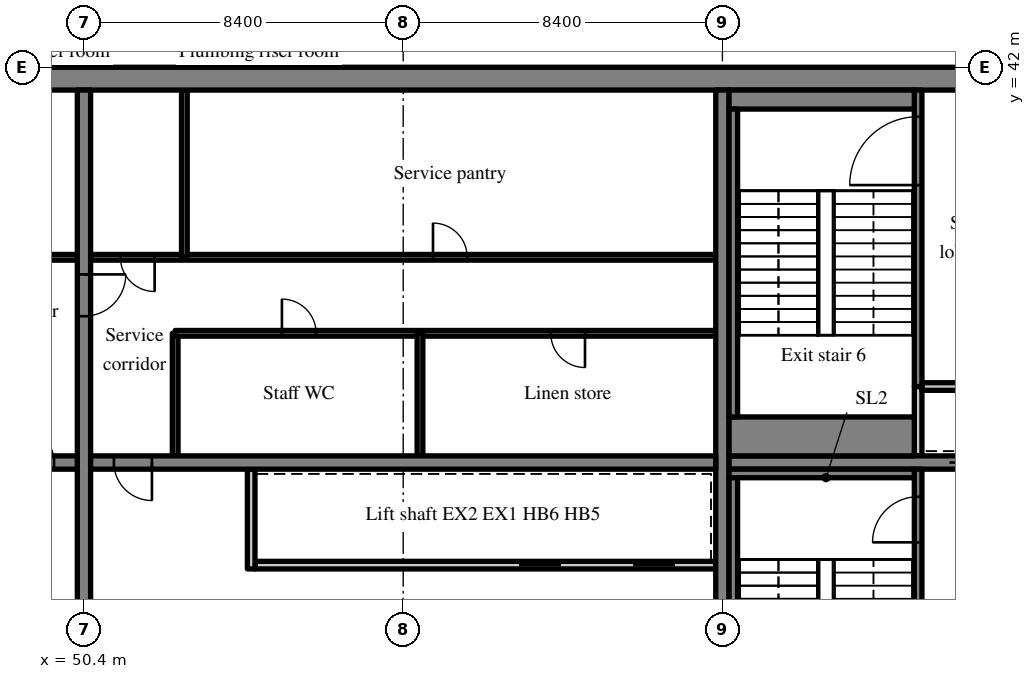
"""IFC4 building model, lengths in metres.
Left out: names, types, materials, properties, quantities, classifications, styles, units other than length and angle.
Written with IfcOpenShell. Run it as: python <this file> out.ifc"""

import sys

from ifc_helpers import new_model, si_unit, direction, frame, frame_2d, origin, place, context, subcontext, project, spatial, rectangle, extrude, source, transform, mapped, element, fill, save


model = new_model("IFC4")
c1 = context("Model", 3, precision=1e-05, world=origin(), true_north=direction((0.0, 1.0)))
c2 = subcontext(c1, "Body", "Model", "MODEL_VIEW")
j1 = project(units=[si_unit("LENGTHUNIT", "METRE"), si_unit("PLANEANGLEUNIT", "RADIAN")], contexts=[c1])
p1 = place(None, origin())
s1 = spatial("IfcSite", under=j1, at=p1, CompositionType="ELEMENT")
p2 = place(p1, origin())
s2 = spatial("IfcBuilding", under=s1, at=p2, CompositionType="ELEMENT")
p3 = place(p2, frame((0.0, 0.0, 256.9)))
s3 = spatial("IfcBuildingStorey", under=s2, at=p3, CompositionType="ELEMENT", Elevation=256.9)
m1 = source(origin(), c2, "Body", "SweptSolid", [
    extrude(rectangle(XDim=50.4, YDim=0.6, at=frame_2d((25.2, 0.0))), origin(), (0.0, 0.0, 1.0), 3.62),
])
p4 = place(p3, frame((25.2, 41.7, 0.0), z_axis=(0.0, 0.0, 1.0), x_axis=(1.0, 0.0, 0.0)))
e1 = element("IfcWall", 1, at=p4, inside=s3, PredefinedType="SHEAR", context=c2, shape_type="MappedRepresentation", body=[
    mapped(m1, transform((0.0, 0.0, 0.0), scale=1.0)),
])
m2 = source(origin(), c2, "Body", "SweptSolid", [
    extrude(rectangle(XDim=18.8, YDim=0.35, at=frame_2d((9.4, 0.0))), origin(), (0.0, 0.0, 1.0), 3.62),
])
p5 = place(p3, frame((50.4, 22.6, 0.0), z_axis=(0.0, 0.0, 1.0), x_axis=(0.0, 1.0, 0.0)))
e2 = element("IfcWall", 2, at=p5, inside=s3, PredefinedType="SHEAR", context=c2, shape_type="MappedRepresentation", body=[
    mapped(m2, transform((0.0, 0.0, 0.0), scale=1.0)),
])
m3 = source(origin(), c2, "Body", "SweptSolid", [
    extrude(rectangle(XDim=1.1, YDim=2.1, at=frame_2d((0.55, 1.05))), frame((0.0, 0.185, 0.0), z_axis=(0.0, -1.0, 0.0), x_axis=(1.0, 0.0, 0.0)), (0.0, 0.0, 1.0), 0.37),
])
p6 = place(p5, frame((12.85, 0.0, 0.0)))
e3 = element("IfcOpeningElement", 3, at=p6, cuts=e2, PredefinedType="OPENING", context=c2, shape_type="MappedRepresentation", body=[
    mapped(m3, transform((0.0, 0.0, 0.0), scale=1.0)),
])
p7 = place(p3, frame((67.2, 22.6, 0.0), z_axis=(0.0, 0.0, 1.0), x_axis=(0.0, 1.0, 0.0)))
e4 = element("IfcWall", 4, at=p7, inside=s3, PredefinedType="SHEAR", context=c2, shape_type="MappedRepresentation", body=[
    mapped(m2, transform((0.0, 0.0, 0.0), scale=1.0)),
])
m4 = source(origin(), c2, "Body", "SweptSolid", [
    extrude(rectangle(XDim=16.45, YDim=0.35, at=frame_2d((8.225, 0.0))), origin(), (0.0, 0.0, 1.0), 3.62),
])
p8 = place(p3, frame((33.775, 31.6, 0.0), z_axis=(0.0, 0.0, 1.0), x_axis=(1.0, 0.0, 0.0)))
e5 = element("IfcWall", 5, at=p8, inside=s3, PredefinedType="SHEAR", context=c2, shape_type="MappedRepresentation", body=[
    mapped(m4, transform((0.0, 0.0, 0.0), scale=1.0)),
])
m5 = source(origin(), c2, "Body", "SweptSolid", [
    extrude(rectangle(XDim=1.0, YDim=2.1, at=frame_2d((0.5, 1.05))), frame((0.0, 0.185, 0.0), z_axis=(0.0, -1.0, 0.0), x_axis=(1.0, 0.0, 0.0)), (0.0, 0.0, 1.0), 0.37),
])
p9 = place(p8, frame((14.837, 0.0, 0.0)))
e6 = element("IfcOpeningElement", 6, at=p9, cuts=e5, PredefinedType="OPENING", context=c2, shape_type="MappedRepresentation", body=[
    mapped(m5, transform((0.0, 0.0, 0.0), scale=1.0)),
])
m6 = source(origin(), c2, "Body", "SweptSolid", [
    extrude(rectangle(XDim=16.45, YDim=0.35, at=frame_2d((8.225, 0.0))), origin(), (0.0, 0.0, 1.0), 3.62),
])
p10 = place(p3, frame((50.575, 31.6, 0.0), z_axis=(0.0, 0.0, 1.0), x_axis=(1.0, 0.0, 0.0)))
e7 = element("IfcWall", 7, at=p10, inside=s3, PredefinedType="SHEAR", context=c2, shape_type="MappedRepresentation", body=[
    mapped(m6, transform((0.0, 0.0, 0.0), scale=1.0)),
])
p11 = place(p10, frame((0.613, 0.0, 0.0)))
e8 = element("IfcOpeningElement", 8, at=p11, cuts=e7, PredefinedType="OPENING", context=c2, shape_type="MappedRepresentation", body=[
    mapped(m5, transform((0.0, 0.0, 0.0), scale=1.0)),
])
m7 = source(origin(), c2, "Body", "SweptSolid", [
    extrude(rectangle(XDim=7.625, YDim=0.35, at=frame_2d((3.812, 0.0))), origin(), (0.0, 0.0, 1.0), 3.62),
])
p12 = place(p3, frame((67.375, 31.6, 0.0), z_axis=(0.0, 0.0, 1.0), x_axis=(1.0, 0.0, 0.0)))
e9 = element("IfcWall", 9, at=p12, inside=s3, PredefinedType="SHEAR", context=c2, shape_type="MappedRepresentation", body=[
    mapped(m7, transform((0.0, 0.0, 0.0), scale=1.0)),
])
p13 = place(p12, frame((5.8, 0.0, 0.0)))
e10 = element("IfcOpeningElement", 10, at=p13, cuts=e9, PredefinedType="OPENING", context=c2, shape_type="MappedRepresentation", body=[
    mapped(m3, transform((0.0, 0.0, 0.0), scale=1.0)),
])
m8 = source(origin(), c2, "Body", "SweptSolid", [
    extrude(rectangle(XDim=16.45, YDim=0.15, at=frame_2d((8.225, 0.0))), origin(), (0.0, 0.0, 1.0), 3.62),
])
p14 = place(p3, frame((33.775, 37.0, 0.0), z_axis=(0.0, 0.0, 1.0), x_axis=(1.0, 0.0, 0.0)))
e11 = element("IfcWall", 11, at=p14, inside=s3, PredefinedType="PARTITIONING", context=c2, shape_type="MappedRepresentation", body=[
    mapped(m8, transform((0.0, 0.0, 0.0), scale=1.0)),
])
m9 = source(origin(), c2, "Body", "SweptSolid", [
    extrude(rectangle(XDim=0.9, YDim=2.1, at=frame_2d((0.45, 1.05))), frame((0.0, 0.085, 0.0), z_axis=(0.0, -1.0, 0.0), x_axis=(1.0, 0.0, 0.0)), (0.0, 0.0, 1.0), 0.17),
])
p15 = place(p14, frame((0.784, 0.0, 0.0)))
e12 = element("IfcOpeningElement", 12, at=p15, cuts=e11, PredefinedType="OPENING", context=c2, shape_type="MappedRepresentation", body=[
    mapped(m9, transform((0.0, 0.0, 0.0), scale=1.0)),
])
p16 = place(p14, frame((3.663, 0.0, 0.0)))
e13 = element("IfcOpeningElement", 13, at=p16, cuts=e11, PredefinedType="OPENING", context=c2, shape_type="MappedRepresentation", body=[
    mapped(m9, transform((0.0, 0.0, 0.0), scale=1.0)),
])
p17 = place(p14, frame((9.42, 0.0, 0.0)))
e14 = element("IfcOpeningElement", 14, at=p17, cuts=e11, PredefinedType="OPENING", context=c2, shape_type="MappedRepresentation", body=[
    mapped(m9, transform((0.0, 0.0, 0.0), scale=1.0)),
])
p18 = place(p14, frame((14.766, 0.0, 0.0)))
e15 = element("IfcOpeningElement", 15, at=p18, cuts=e11, PredefinedType="OPENING", context=c2, shape_type="MappedRepresentation", body=[
    mapped(m9, transform((0.0, 0.0, 0.0), scale=1.0)),
])
m10 = source(origin(), c2, "Body", "SweptSolid", [
    extrude(rectangle(XDim=12.125, YDim=0.2, at=frame_2d((6.062, 0.0))), origin(), (0.0, 0.0, 1.0), 3.62),
])
p19 = place(p3, frame((67.025, 28.9, 0.0), z_axis=(0.0, 0.0, 1.0), x_axis=(-1.0, 0.0, 0.0)))
e16 = element("IfcWall", 16, at=p19, inside=s3, PredefinedType="SOLIDWALL", context=c2, shape_type="MappedRepresentation", body=[
    mapped(m10, transform((0.0, 0.0, 0.0), scale=1.0)),
])
m11 = source(origin(), c2, "Body", "SweptSolid", [
    extrude(rectangle(XDim=1.1, YDim=2.1, at=frame_2d((0.55, 1.05))), frame((0.0, 0.11, 0.0), z_axis=(0.0, -1.0, 0.0), x_axis=(1.0, 0.0, 0.0)), (0.0, 0.0, 1.0), 0.22),
])
p20 = place(p19, frame((1.075, 0.0, 0.0)))
e17 = element("IfcOpeningElement", 17, at=p20, cuts=e16, PredefinedType="OPENING", context=c2, shape_type="MappedRepresentation", body=[
    mapped(m11, transform((0.0, 0.0, 0.0), scale=1.0)),
])
p21 = place(p19, frame((4.075, 0.0, 0.0)))
e18 = element("IfcOpeningElement", 18, at=p21, cuts=e16, PredefinedType="OPENING", context=c2, shape_type="MappedRepresentation", body=[
    mapped(m11, transform((0.0, 0.0, 0.0), scale=1.0)),
])
m12 = source(origin(), c2, "Body", "SweptSolid", [
    extrude(rectangle(XDim=2.625, YDim=0.2, at=frame_2d((1.312, 0.0))), origin(), (0.0, 0.0, 1.0), 3.62),
])
p22 = place(p3, frame((54.8, 28.8, 0.0), z_axis=(0.0, 0.0, 1.0), x_axis=(0.0, 1.0, 0.0)))
e19 = element("IfcWall", 19, at=p22, inside=s3, PredefinedType="SOLIDWALL", context=c2, shape_type="MappedRepresentation", body=[
    mapped(m12, transform((0.0, 0.0, 0.0), scale=1.0)),
])
m13 = source(origin(), c2, "Body", "SweptSolid", [
    extrude(rectangle(XDim=3.225, YDim=0.15, at=frame_2d((1.613, 0.0))), origin(), (0.0, 0.0, 1.0), 3.62),
])
p23 = place(p3, frame((52.8, 31.775, 0.0), z_axis=(0.0, 0.0, 1.0), x_axis=(0.0, 1.0, 0.0)))
e20 = element("IfcWall", 20, at=p23, inside=s3, PredefinedType="PARTITIONING", context=c2, shape_type="MappedRepresentation", body=[
    mapped(m13, transform((0.0, 0.0, 0.0), scale=1.0)),
])
m14 = source(origin(), c2, "Body", "SweptSolid", [
    extrude(rectangle(XDim=14.225, YDim=0.15, at=frame_2d((7.112, 0.0))), origin(), (0.0, 0.0, 1.0), 3.62),
])
p24 = place(p3, frame((67.025, 35.0, 0.0), z_axis=(0.0, 0.0, 1.0), x_axis=(-1.0, 0.0, 0.0)))
e21 = element("IfcWall", 21, at=p24, inside=s3, PredefinedType="PARTITIONING", context=c2, shape_type="MappedRepresentation", body=[
    mapped(m14, transform((0.0, 0.0, 0.0), scale=1.0)),
])
p25 = place(p24, frame((3.441, 0.0, 0.0)))
e22 = element("IfcOpeningElement", 22, at=p25, cuts=e21, PredefinedType="OPENING", context=c2, shape_type="MappedRepresentation", body=[
    mapped(m9, transform((0.0, 0.0, 0.0), scale=1.0)),
])
p26 = place(p24, frame((10.516, 0.0, 0.0)))
e23 = element("IfcOpeningElement", 23, at=p26, cuts=e21, PredefinedType="OPENING", context=c2, shape_type="MappedRepresentation", body=[
    mapped(m9, transform((0.0, 0.0, 0.0), scale=1.0)),
])
m15 = source(origin(), c2, "Body", "SweptSolid", [
    extrude(rectangle(XDim=16.45, YDim=0.15, at=frame_2d((8.225, 0.0))), origin(), (0.0, 0.0, 1.0), 3.62),
])
p27 = place(p3, frame((67.025, 37.0, 0.0), z_axis=(0.0, 0.0, 1.0), x_axis=(-1.0, 0.0, 0.0)))
e24 = element("IfcWall", 24, at=p27, inside=s3, PredefinedType="PARTITIONING", context=c2, shape_type="MappedRepresentation", body=[
    mapped(m15, transform((0.0, 0.0, 0.0), scale=1.0)),
])
p28 = place(p27, frame((6.541, 0.0, 0.0)))
e25 = element("IfcOpeningElement", 25, at=p28, cuts=e24, PredefinedType="OPENING", context=c2, shape_type="MappedRepresentation", body=[
    mapped(m9, transform((0.0, 0.0, 0.0), scale=1.0)),
])
p29 = place(p27, frame((14.766, 0.0, 0.0)))
e26 = element("IfcOpeningElement", 26, at=p29, cuts=e24, PredefinedType="OPENING", context=c2, shape_type="MappedRepresentation", body=[
    mapped(m9, transform((0.0, 0.0, 0.0), scale=1.0)),
])
p30 = place(p3, frame((59.242, 31.775, 0.0), z_axis=(0.0, 0.0, 1.0), x_axis=(0.0, 1.0, 0.0)))
e27 = element("IfcWall", 27, at=p30, inside=s3, PredefinedType="PARTITIONING", context=c2, shape_type="MappedRepresentation", body=[
    mapped(m13, transform((0.0, 0.0, 0.0), scale=1.0)),
])
m16 = source(origin(), c2, "Body", "SweptSolid", [
    extrude(rectangle(XDim=4.4, YDim=0.15, at=frame_2d((2.2, 0.0))), origin(), (0.0, 0.0, 1.0), 3.62),
])
p31 = place(p3, frame((53.042, 37.0, 0.0), z_axis=(0.0, 0.0, 1.0), x_axis=(0.0, 1.0, 0.0)))
e28 = element("IfcWall", 28, at=p31, inside=s3, PredefinedType="PARTITIONING", context=c2, shape_type="MappedRepresentation", body=[
    mapped(m16, transform((0.0, 0.0, 0.0), scale=1.0)),
])
m17 = source(origin(), c2, "Body", "SweptSolid", [
    extrude(rectangle(XDim=8.825, YDim=0.2, at=frame_2d((4.413, 0.0))), origin(), (0.0, 0.0, 1.0), 3.62),
])
p32 = place(p3, frame((72.35, 22.6, 0.0), z_axis=(0.0, 0.0, 1.0), x_axis=(0.0, 1.0, 0.0)))
e29 = element("IfcWall", 29, at=p32, inside=s3, PredefinedType="SOLIDWALL", context=c2, shape_type="MappedRepresentation", body=[
    mapped(m17, transform((0.0, 0.0, 0.0), scale=1.0)),
])
m18 = source(origin(), c2, "Body", "SweptSolid", [
    extrude(rectangle(XDim=1.2, YDim=2.1, at=frame_2d((0.6, 1.05))), frame((0.0, 0.11, 0.0), z_axis=(0.0, -1.0, 0.0), x_axis=(1.0, 0.0, 0.0)), (0.0, 0.0, 1.0), 0.22),
])
p33 = place(p32, frame((6.9, 0.0, 0.0)))
e30 = element("IfcOpeningElement", 30, at=p33, cuts=e29, PredefinedType="OPENING", context=c2, shape_type="MappedRepresentation", body=[
    mapped(m18, transform((0.0, 0.0, 0.0), scale=1.0)),
])
m19 = source(origin(), c2, "Body", "SweptSolid", [
    extrude(rectangle(XDim=1.825, YDim=0.2, at=frame_2d((0.913, 0.0))), origin(), (0.0, 0.0, 1.0), 3.62),
])
p34 = place(p3, frame((72.35, 31.775, 0.0), z_axis=(0.0, 0.0, 1.0), x_axis=(0.0, 1.0, 0.0)))
e31 = element("IfcWall", 31, at=p34, inside=s3, PredefinedType="SOLIDWALL", context=c2, shape_type="MappedRepresentation", body=[
    mapped(m19, transform((0.0, 0.0, 0.0), scale=1.0)),
])
m20 = source(origin(), c2, "Body", "SweptSolid", [
    extrude(rectangle(XDim=2.55, YDim=0.2, at=frame_2d((1.275, 0.0))), origin(), (0.0, 0.0, 1.0), 3.62),
])
p35 = place(p3, frame((72.45, 33.6, 0.0), z_axis=(0.0, 0.0, 1.0), x_axis=(1.0, 0.0, 0.0)))
e32 = element("IfcWall", 32, at=p35, inside=s3, PredefinedType="SOLIDWALL", context=c2, shape_type="MappedRepresentation", body=[
    mapped(m20, transform((0.0, 0.0, 0.0), scale=1.0)),
])
m21 = source(origin(), c2, "Body", "SweptSolid", [
    extrude(rectangle(XDim=7.8, YDim=0.2, at=frame_2d((3.9, 0.0))), origin(), (0.0, 0.0, 1.0), 3.62),
])
p36 = place(p3, frame((72.35, 33.6, 0.0), z_axis=(0.0, 0.0, 1.0), x_axis=(0.0, 1.0, 0.0)))
e33 = element("IfcWall", 33, at=p36, inside=s3, PredefinedType="SOLIDWALL", context=c2, shape_type="MappedRepresentation", body=[
    mapped(m21, transform((0.0, 0.0, 0.0), scale=1.0)),
])
m22 = source(origin(), c2, "Body", "SweptSolid", [
    extrude(rectangle(XDim=1.8, YDim=2.1, at=frame_2d((0.9, 1.05))), frame((0.0, 0.11, 0.0), z_axis=(0.0, -1.0, 0.0), x_axis=(1.0, 0.0, 0.0)), (0.0, 0.0, 1.0), 0.22),
])
p37 = place(p36, frame((5.3, 0.0, 0.0)))
e34 = element("IfcOpeningElement", 34, at=p37, cuts=e33, PredefinedType="OPENING", context=c2, shape_type="MappedRepresentation", body=[
    mapped(m22, transform((0.0, 0.0, 0.0), scale=1.0)),
])
m23 = source(origin(), c2, "Body", "SweptSolid", [
    extrude(rectangle(XDim=4.875, YDim=0.225, at=frame_2d((2.438, 0.0))), origin(), (0.0, 0.0, 1.0), 3.62),
])
p38 = place(p3, frame((67.375, 31.312, 0.0), z_axis=(0.0, 0.0, 1.0), x_axis=(1.0, 0.0, 0.0)))
e35 = element("IfcWall", 35, at=p38, inside=s3, PredefinedType="SOLIDWALL", context=c2, shape_type="MappedRepresentation", body=[
    mapped(m23, transform((0.0, 0.0, 0.0), scale=1.0)),
])
m24 = source(origin(), c2, "Body", "SweptSolid", [
    extrude(rectangle(XDim=8.1, YDim=0.225, at=frame_2d((4.05, 0.0))), origin(), (0.0, 0.0, 1.0), 3.62),
])
p39 = place(p3, frame((67.487, 23.1, 0.0), z_axis=(0.0, 0.0, 1.0), x_axis=(0.0, 1.0, 0.0)))
e36 = element("IfcWall", 36, at=p39, inside=s3, PredefinedType="SOLIDWALL", context=c2, shape_type="MappedRepresentation", body=[
    mapped(m24, transform((0.0, 0.0, 0.0), scale=1.0)),
])
m25 = source(origin(), c2, "Body", "SweptSolid", [
    extrude(rectangle(XDim=4.875, YDim=0.5, at=frame_2d((2.438, 0.0))), origin(), (0.0, 0.0, 1.0), 3.62),
])
p40 = place(p3, frame((67.375, 41.15, 0.0), z_axis=(0.0, 0.0, 1.0), x_axis=(1.0, 0.0, 0.0)))
e37 = element("IfcWall", 37, at=p40, inside=s3, PredefinedType="SOLIDWALL", context=c2, shape_type="MappedRepresentation", body=[
    mapped(m25, transform((0.0, 0.0, 0.0), scale=1.0)),
])
m26 = source(origin(), c2, "Body", "SweptSolid", [
    extrude(rectangle(XDim=4.875, YDim=1.025, at=frame_2d((2.438, 0.0))), origin(), (0.0, 0.0, 1.0), 3.62),
])
p41 = place(p3, frame((67.375, 32.287, 0.0), z_axis=(0.0, 0.0, 1.0), x_axis=(1.0, 0.0, 0.0)))
e38 = element("IfcWall", 38, at=p41, inside=s3, PredefinedType="SOLIDWALL", context=c2, shape_type="MappedRepresentation", body=[
    mapped(m26, transform((0.0, 0.0, 0.0), scale=1.0)),
])
p42 = place(p3, frame((67.487, 32.8, 0.0), z_axis=(0.0, 0.0, 1.0), x_axis=(0.0, 1.0, 0.0)))
e39 = element("IfcWall", 39, at=p42, inside=s3, PredefinedType="SOLIDWALL", context=c2, shape_type="MappedRepresentation", body=[
    mapped(m24, transform((0.0, 0.0, 0.0), scale=1.0)),
])
m27 = source(origin(), c2, "Body", "SweptSolid", [
    extrude(rectangle(XDim=1.0, YDim=2.1, at=frame_2d((0.5, 1.05))), frame((0.0, 0.025, 0.0), z_axis=(0.0, -1.0, 0.0), x_axis=(1.0, 0.0, 0.0)), (0.0, 0.0, 1.0), 0.05),
])
p43 = place(p9, origin())
e40 = element("IfcDoor", 40, at=p43, inside=s3, OperationType="SINGLE_SWING_LEFT", PredefinedType="DOOR", context=c2, shape_type="MappedRepresentation", body=[
    mapped(m27, transform((0.0, 0.0, 0.0), scale=1.0)),
])
fill(e6, e40)
p44 = place(p11, origin())
e41 = element("IfcDoor", 41, at=p44, inside=s3, OperationType="SINGLE_SWING_RIGHT", PredefinedType="DOOR", context=c2, shape_type="MappedRepresentation", body=[
    mapped(m27, transform((0.0, 0.0, 0.0), scale=1.0)),
])
fill(e8, e41)
m28 = source(origin(), c2, "Body", "SweptSolid", [
    extrude(rectangle(XDim=1.1, YDim=2.1, at=frame_2d((0.55, 1.05))), frame((0.0, 0.025, 0.0), z_axis=(0.0, -1.0, 0.0), x_axis=(1.0, 0.0, 0.0)), (0.0, 0.0, 1.0), 0.05),
])
p45 = place(p20, origin())
e42 = element("IfcDoor", 42, at=p45, inside=s3, OperationType="SLIDING_TO_RIGHT", PredefinedType="DOOR", context=c2, shape_type="MappedRepresentation", body=[
    mapped(m28, transform((0.0, 0.0, 0.0), scale=1.0)),
])
fill(e17, e42)
p46 = place(p21, origin())
e43 = element("IfcDoor", 43, at=p46, inside=s3, OperationType="SLIDING_TO_LEFT", PredefinedType="DOOR", context=c2, shape_type="MappedRepresentation", body=[
    mapped(m28, transform((0.0, 0.0, 0.0), scale=1.0)),
])
fill(e18, e43)
m29 = source(origin(), c2, "Body", "SweptSolid", [
    extrude(rectangle(XDim=0.9, YDim=2.1, at=frame_2d((0.45, 1.05))), frame((0.0, 0.025, 0.0), z_axis=(0.0, -1.0, 0.0), x_axis=(1.0, 0.0, 0.0)), (0.0, 0.0, 1.0), 0.05),
])
p47 = place(p25, origin())
e44 = element("IfcDoor", 44, at=p47, inside=s3, OperationType="SINGLE_SWING_LEFT", PredefinedType="DOOR", context=c2, shape_type="MappedRepresentation", body=[
    mapped(m29, transform((0.0, 0.0, 0.0), scale=1.0)),
])
fill(e22, e44)
p48 = place(p26, origin())
e45 = element("IfcDoor", 45, at=p48, inside=s3, OperationType="SINGLE_SWING_RIGHT", PredefinedType="DOOR", context=c2, shape_type="MappedRepresentation", body=[
    mapped(m29, transform((0.0, 0.0, 0.0), scale=1.0)),
])
fill(e23, e45)
p49 = place(p28, origin())
e46 = element("IfcDoor", 46, at=p49, inside=s3, OperationType="SINGLE_SWING_RIGHT", PredefinedType="DOOR", context=c2, shape_type="MappedRepresentation", body=[
    mapped(m29, transform((0.0, 0.0, 0.0), scale=1.0)),
])
fill(e25, e46)
p50 = place(p29, origin())
e47 = element("IfcDoor", 47, at=p50, inside=s3, OperationType="SINGLE_SWING_LEFT", PredefinedType="DOOR", context=c2, shape_type="MappedRepresentation", body=[
    mapped(m29, transform((0.0, 0.0, 0.0), scale=1.0)),
])
fill(e26, e47)
m30 = source(origin(), c2, "Body", "SweptSolid", [
    extrude(rectangle(XDim=1.2, YDim=2.1, at=frame_2d((0.6, 1.05))), frame((0.0, 0.025, 0.0), z_axis=(0.0, -1.0, 0.0), x_axis=(1.0, 0.0, 0.0)), (0.0, 0.0, 1.0), 0.05),
])
p51 = place(p33, origin())
e48 = element("IfcDoor", 48, at=p51, inside=s3, OperationType="SINGLE_SWING_LEFT", PredefinedType="DOOR", context=c2, shape_type="MappedRepresentation", body=[
    mapped(m30, transform((0.0, 0.0, 0.0), scale=1.0)),
])
fill(e30, e48)
p52 = place(p13, origin())
e49 = element("IfcDoor", 49, at=p52, inside=s3, OperationType="SLIDING_TO_RIGHT", PredefinedType="DOOR", context=c2, shape_type="MappedRepresentation", body=[
    mapped(m28, transform((0.0, 0.0, 0.0), scale=1.0)),
])
fill(e10, e49)
m31 = source(origin(), c2, "Body", "SweptSolid", [
    extrude(rectangle(XDim=1.8, YDim=2.1, at=frame_2d((0.9, 1.05))), frame((0.0, 0.025, 0.0), z_axis=(0.0, -1.0, 0.0), x_axis=(1.0, 0.0, 0.0)), (0.0, 0.0, 1.0), 0.05),
])
p53 = place(p37, origin())
e50 = element("IfcDoor", 50, at=p53, inside=s3, OperationType="SINGLE_SWING_LEFT", PredefinedType="DOOR", context=c2, shape_type="MappedRepresentation", body=[
    mapped(m31, transform((0.0, 0.0, 0.0), scale=1.0)),
])
fill(e34, e50)
p54 = place(p6, origin())
e51 = element("IfcDoor", 51, at=p54, inside=s3, OperationType="SINGLE_SWING_RIGHT", PredefinedType="DOOR", context=c2, shape_type="MappedRepresentation", body=[
    mapped(m28, transform((0.0, 0.0, 0.0), scale=1.0)),
])
fill(e3, e51)
save(model, sys.argv[1])
